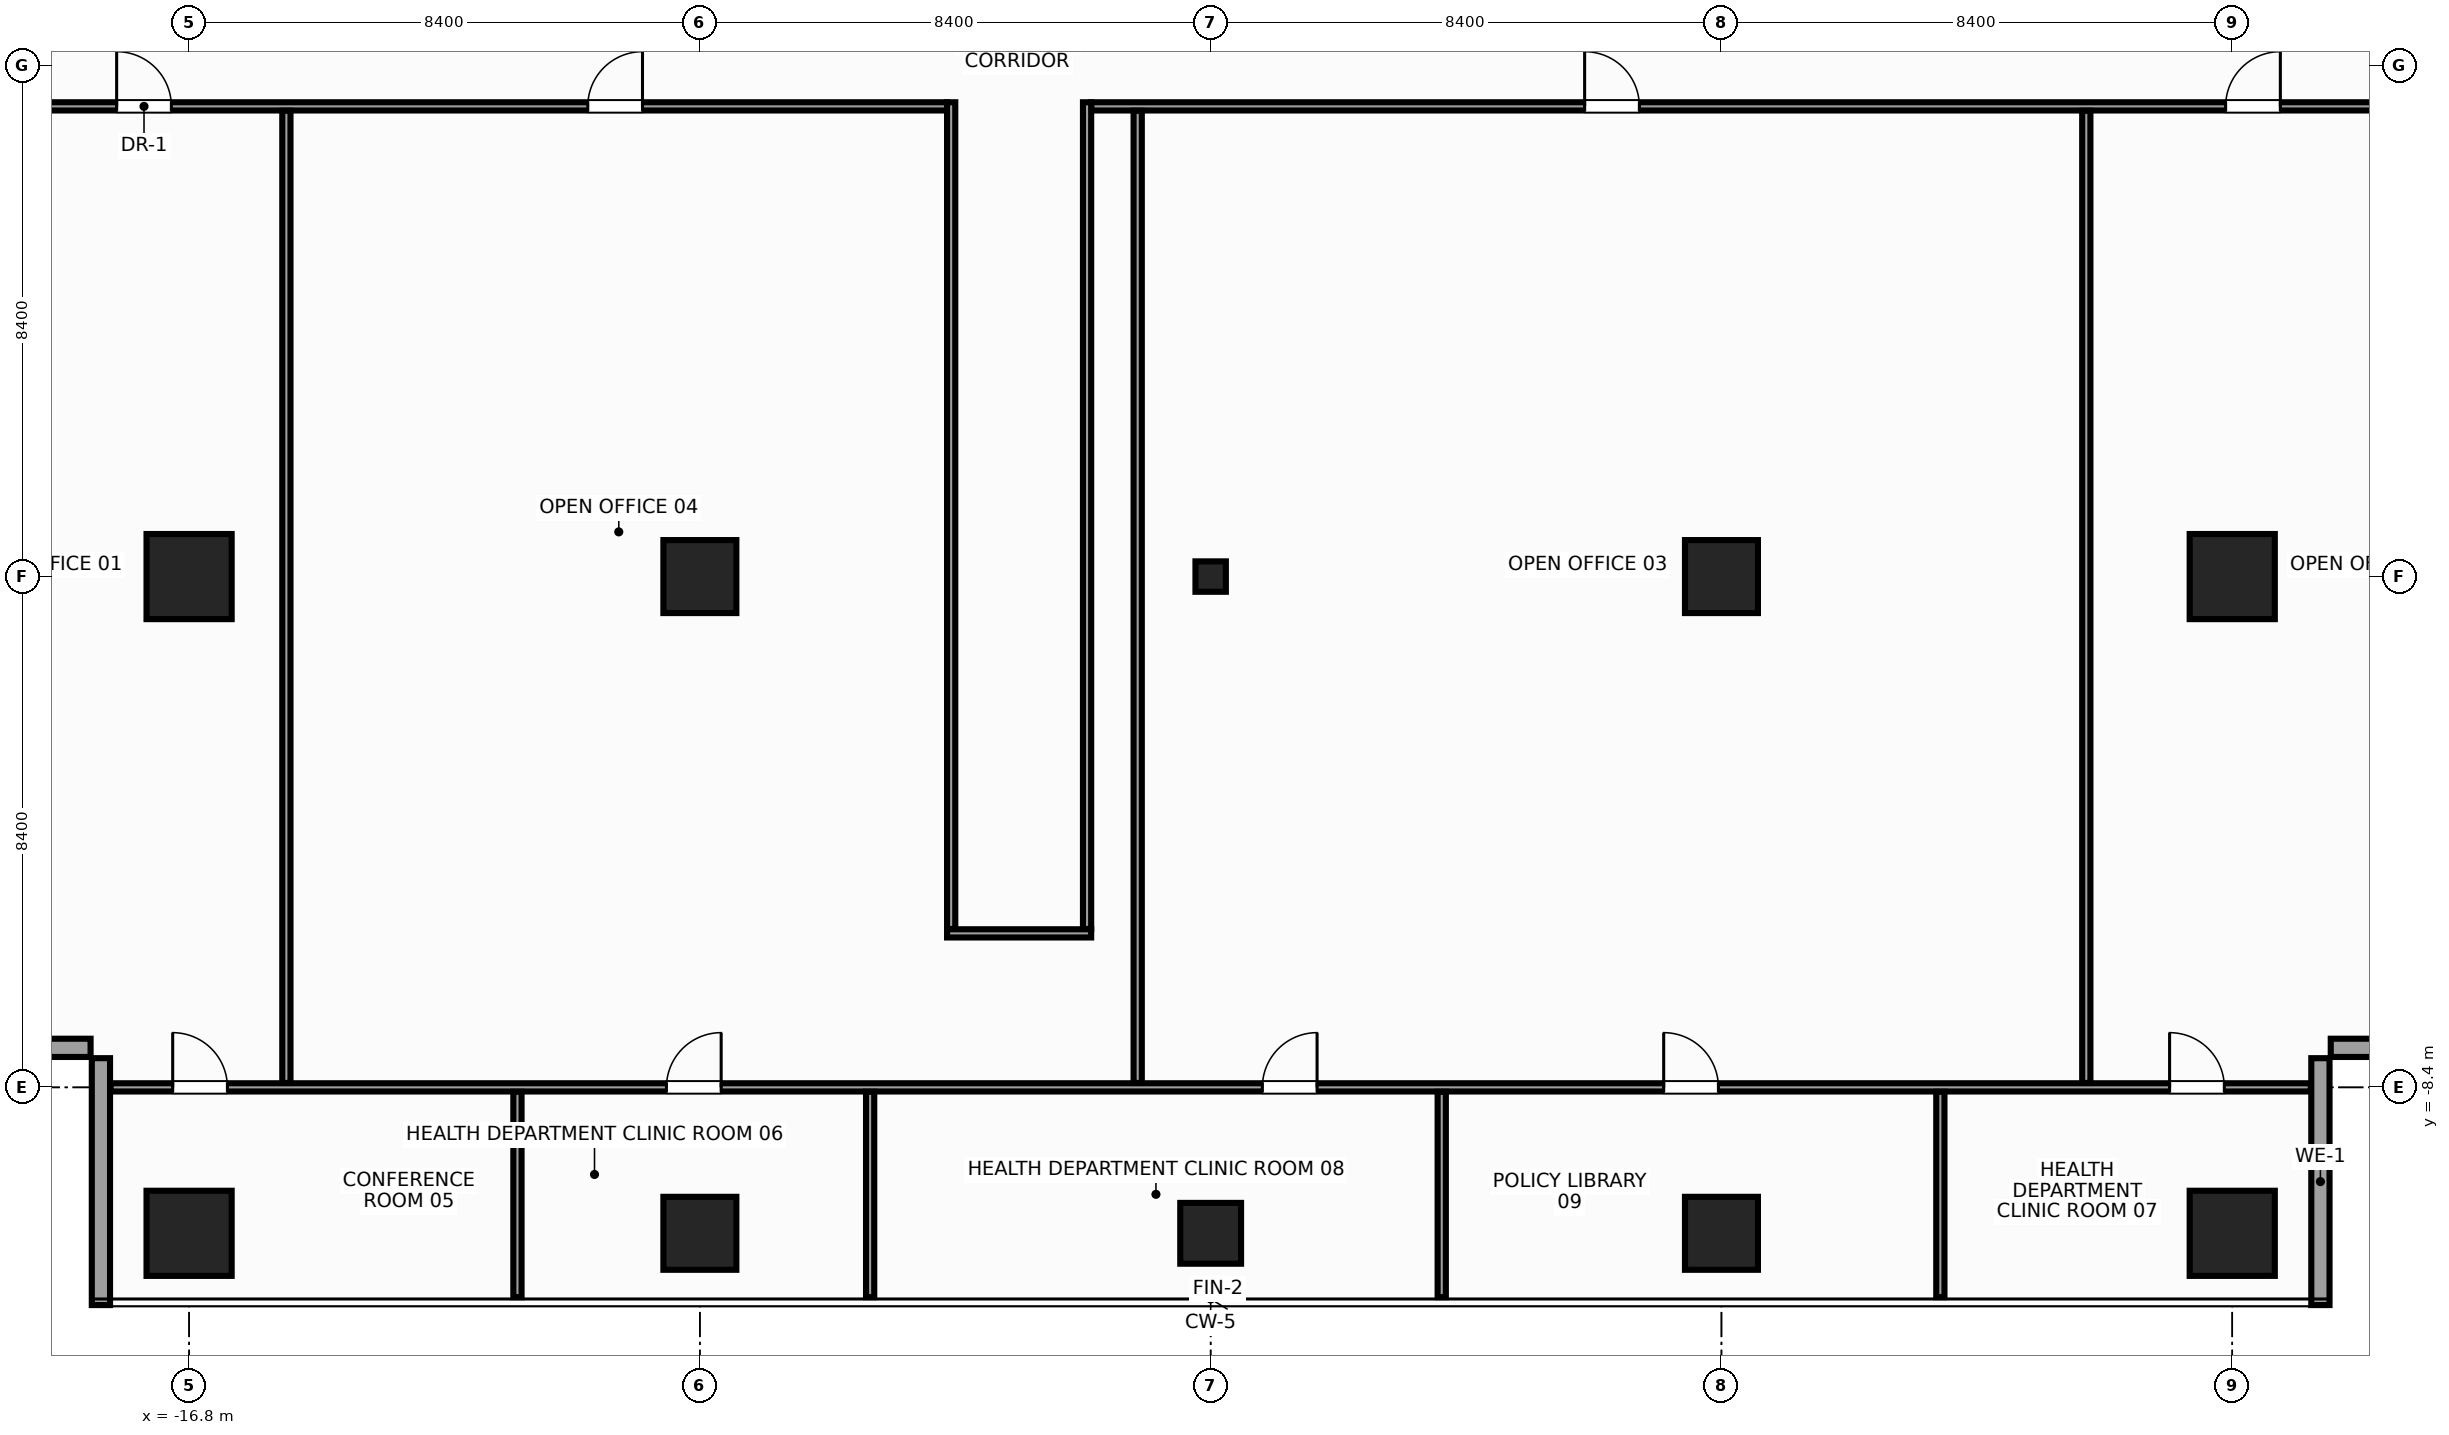
"""IFC4 building model, lengths in metres.
Left out: names, types, materials, properties, quantities, classifications, styles, units other than length and angle.
Written with IfcOpenShell. Run it as: python <this file> out.ifc"""

import sys

from ifc_helpers import new_model, si_unit, direction, frame, frame_2d, origin, origin_with_axes, origin_2d, place, context, subcontext, project, spatial, rectangle, hollow_rectangle, extrude, source, transform, mapped, element, fill, save


model = new_model("IFC4")
c1 = context("Model", 3, precision=1e-05, world=origin(), true_north=direction((0.0, 1.0)))
c2 = subcontext(c1, "Body", "Model", "MODEL_VIEW")
j1 = project(units=[si_unit("LENGTHUNIT", "METRE"), si_unit("PLANEANGLEUNIT", "RADIAN")], contexts=[c1])
p1 = place(None, origin())
s1 = spatial("IfcSite", under=j1, at=p1, CompositionType="ELEMENT")
p2 = place(p1, origin())
s2 = spatial("IfcBuilding", under=s1, at=p2, CompositionType="ELEMENT")
p3 = place(p2, frame((0.0, 0.0, 232.4)))
s3 = spatial("IfcBuildingStorey", under=s2, at=p3, CompositionType="ELEMENT", Elevation=232.4)
m1 = source(origin(), c2, "Body", "SweptSolid", [
    extrude(rectangle(XDim=1.4, YDim=1.4, at=origin_2d()), origin(), (0.0, 0.0, 1.0), 3.6),
])
for number, where, z_axis, x_axis in (
    (1, (-16.8, -10.8, 0.0), (0.0, 0.0, 1.0), (1.0, 0.0, 0.0)),
    (2, (-16.8, 0.0, 0.0), (0.0, 0.0, 1.0), (1.0, 0.0, 0.0)),
    (3, (16.8, -10.8, 0.0), (0.0, 0.0, 1.0), (1.0, 0.0, 0.0)),
    (4, (16.8, 0.0, 0.0), (0.0, 0.0, 1.0), (1.0, 0.0, 0.0)),
):
    element("IfcColumn", number, at=place(p3, frame(where, z_axis=z_axis, x_axis=x_axis)), inside=s3, PredefinedType="COLUMN", context=c2, shape_type="MappedRepresentation", body=[
        mapped(m1, transform((0.0, 0.0, 0.0), x_axis=(1.0, 0.0, 0.0), y_axis=(0.0, 1.0, 0.0), z_axis=(0.0, 0.0, 1.0), scale=1.0)),
    ])
m2 = source(origin(), c2, "Body", "SweptSolid", [
    extrude(rectangle(XDim=1.2, YDim=1.2, at=origin_2d()), origin(), (0.0, 0.0, 1.0), 3.6),
])
for number, where, z_axis, x_axis in (
    (5, (-8.4, 0.0, 0.0), (0.0, 0.0, 1.0), (1.0, 0.0, 0.0)),
    (6, (-8.4, -10.8, 0.0), (0.0, 0.0, 1.0), (1.0, 0.0, 0.0)),
    (7, (8.4, 0.0, 0.0), (0.0, 0.0, 1.0), (1.0, 0.0, 0.0)),
    (8, (8.4, -10.8, 0.0), (0.0, 0.0, 1.0), (1.0, 0.0, 0.0)),
):
    element("IfcColumn", number, at=place(p3, frame(where, z_axis=z_axis, x_axis=x_axis)), inside=s3, PredefinedType="COLUMN", context=c2, shape_type="MappedRepresentation", body=[
        mapped(m2, transform((0.0, 0.0, 0.0), x_axis=(1.0, 0.0, 0.0), y_axis=(0.0, 1.0, 0.0), z_axis=(0.0, 0.0, 1.0), scale=1.0)),
    ])
m3 = source(origin(), c2, "Body", "SweptSolid", [
    extrude(rectangle(XDim=1.0, YDim=1.0, at=origin_2d()), origin(), (0.0, 0.0, 1.0), 3.6),
])
p4 = place(p3, frame((0.0, -10.8, 0.0), z_axis=(0.0, 0.0, 1.0), x_axis=(1.0, 0.0, 0.0)))
e9 = element("IfcColumn", 9, at=p4, inside=s3, PredefinedType="COLUMN", context=c2, shape_type="MappedRepresentation", body=[
    mapped(m3, transform((0.0, 0.0, 0.0), x_axis=(1.0, 0.0, 0.0), y_axis=(0.0, 1.0, 0.0), z_axis=(0.0, 0.0, 1.0), scale=1.0)),
])
m4 = source(origin(), c2, "Body", "SweptSolid", [
    extrude(hollow_rectangle(XDim=0.5, YDim=0.5, WallThickness=0.025, at=origin_2d()), origin(), (0.0, 0.0, 1.0), 3.6),
])
p5 = place(p3, origin_with_axes())
e10 = element("IfcColumn", 10, at=p5, inside=s3, PredefinedType="COLUMN", context=c2, shape_type="MappedRepresentation", body=[
    mapped(m4, transform((0.0, 0.0, 0.0), x_axis=(1.0, 0.0, 0.0), y_axis=(0.0, 1.0, 0.0), z_axis=(0.0, 0.0, 1.0), scale=1.0)),
])
m5 = source(origin(), c2, "Body", "SweptSolid", [
    extrude(rectangle(XDim=4.06, YDim=0.3, at=frame_2d((2.03, 0.0))), origin(), (0.0, 0.0, 1.0), 2.75),
])
for number, where, z_axis, x_axis in (
    (11, (18.25, -11.98, 0.0), (0.0, 0.0, 1.0), (0.0, 1.0, 0.0)),
    (12, (18.42, -7.75, 0.0), (0.0, 0.0, 1.0), (1.0, 0.0, 0.0)),
    (13, (-22.48, -7.75, 0.0), (0.0, 0.0, 1.0), (1.0, 0.0, 0.0)),
    (14, (-18.25, -7.92, 0.0), (0.0, 0.0, 1.0), (0.0, -1.0, 0.0)),
):
    element("IfcWall", number, at=place(p3, frame(where, z_axis=z_axis, x_axis=x_axis)), inside=s3, PredefinedType="STANDARD", context=c2, shape_type="MappedRepresentation", body=[
        mapped(m5, transform((0.0, 0.0, 0.0), x_axis=(1.0, 0.0, 0.0), y_axis=(0.0, 1.0, 0.0), z_axis=(0.0, 0.0, 1.0), scale=1.0)),
    ])
m6 = source(origin(), c2, "Body", "SweptSolid", [
    extrude(rectangle(XDim=15.6, YDim=0.135, at=frame_2d((7.8, 0.0))), origin(), (0.0, 0.0, 1.0), 2.755),
])
p6 = place(p3, frame((-19.935, 7.732, 0.0), z_axis=(0.0, 0.0, 1.0), x_axis=(1.0, 0.0, 0.0)))
e15 = element("IfcWall", 15, at=p6, inside=s3, PredefinedType="PARTITIONING", context=c2, shape_type="MappedRepresentation", body=[
    mapped(m6, transform((0.0, 0.0, 0.0), x_axis=(1.0, 0.0, 0.0), y_axis=(0.0, 1.0, 0.0), z_axis=(0.0, 0.0, 1.0), scale=1.0)),
])
p7 = place(p6, frame((1.944, 0.0, 0.0)))
e16 = element("IfcOpeningElement", 16, at=p7, cuts=e15, PredefinedType="OPENING", context=c2, shape_type="SweptSolid", body=[
    extrude(rectangle(XDim=0.9, YDim=2.15, at=frame_2d((0.45, 1.075))), frame((0.0, 0.08, 0.0), z_axis=(0.0, -1.0, 0.0), x_axis=(1.0, 0.0, 0.0)), (0.0, 0.0, 1.0), 0.159),
])
p8 = place(p6, frame((9.691, 0.0, 0.0)))
e17 = element("IfcOpeningElement", 17, at=p8, cuts=e15, PredefinedType="OPENING", context=c2, shape_type="SweptSolid", body=[
    extrude(rectangle(XDim=0.9, YDim=2.15, at=frame_2d((0.45, 1.075))), frame((0.0, 0.08, 0.0), z_axis=(0.0, -1.0, 0.0), x_axis=(1.0, 0.0, 0.0)), (0.0, 0.0, 1.0), 0.159),
])
m7 = source(origin(), c2, "Body", "SweptSolid", [
    extrude(rectangle(XDim=21.9, YDim=0.135, at=frame_2d((10.95, 0.0))), origin(), (0.0, 0.0, 1.0), 2.755),
])
p9 = place(p3, frame((-1.965, 7.732, 0.0), z_axis=(0.0, 0.0, 1.0), x_axis=(1.0, 0.0, 0.0)))
e18 = element("IfcWall", 18, at=p9, inside=s3, PredefinedType="PARTITIONING", context=c2, shape_type="MappedRepresentation", body=[
    mapped(m7, transform((0.0, 0.0, 0.0), x_axis=(1.0, 0.0, 0.0), y_axis=(0.0, 1.0, 0.0), z_axis=(0.0, 0.0, 1.0), scale=1.0)),
])
p10 = place(p9, frame((18.656, 0.0, 0.0)))
e19 = element("IfcOpeningElement", 19, at=p10, cuts=e18, PredefinedType="OPENING", context=c2, shape_type="SweptSolid", body=[
    extrude(rectangle(XDim=0.9, YDim=2.15, at=frame_2d((0.45, 1.075))), frame((0.0, 0.08, 0.0), z_axis=(0.0, -1.0, 0.0), x_axis=(1.0, 0.0, 0.0)), (0.0, 0.0, 1.0), 0.159),
])
p11 = place(p9, frame((8.115, 0.0, 0.0)))
e20 = element("IfcOpeningElement", 20, at=p11, cuts=e18, PredefinedType="OPENING", context=c2, shape_type="SweptSolid", body=[
    extrude(rectangle(XDim=0.9, YDim=2.15, at=frame_2d((0.45, 1.075))), frame((0.0, 0.08, 0.0), z_axis=(0.0, -1.0, 0.0), x_axis=(1.0, 0.0, 0.0)), (0.0, 0.0, 1.0), 0.159),
])
m8 = source(origin(), c2, "Body", "SweptSolid", [
    extrude(rectangle(XDim=2.37, YDim=0.135, at=frame_2d((1.185, 0.0))), origin(), (0.0, 0.0, 1.0), 3.37),
])
p12 = place(p3, frame((-4.335, -5.867, 0.0), z_axis=(0.0, 0.0, 1.0), x_axis=(1.0, 0.0, 0.0)))
e21 = element("IfcWall", 21, at=p12, inside=s3, PredefinedType="PARTITIONING", context=c2, shape_type="MappedRepresentation", body=[
    mapped(m8, transform((0.0, 0.0, 0.0), x_axis=(1.0, 0.0, 0.0), y_axis=(0.0, 1.0, 0.0), z_axis=(0.0, 0.0, 1.0), scale=1.0)),
])
m9 = source(origin(), c2, "Body", "SweptSolid", [
    extrude(rectangle(XDim=13.595, YDim=0.135, at=frame_2d((6.797, 0.0))), origin(), (0.0, 0.0, 1.0), 2.655),
])
for number, where, z_axis, x_axis in (
    (22, (-4.268, -5.795, 0.0), (0.0, 0.0, 1.0), (0.0, 1.0, 0.0)),
    (23, (-2.032, -5.795, 0.0), (0.0, 0.0, 1.0), (0.0, 1.0, 0.0)),
):
    element("IfcWall", number, at=place(p3, frame(where, z_axis=z_axis, x_axis=x_axis)), inside=s3, PredefinedType="PARTITIONING", context=c2, shape_type="MappedRepresentation", body=[
        mapped(m9, transform((0.0, 0.0, 0.0), x_axis=(1.0, 0.0, 0.0), y_axis=(0.0, 1.0, 0.0), z_axis=(0.0, 0.0, 1.0), scale=1.0)),
    ])
m10 = source(origin(), c2, "Body", "SweptSolid", [
    extrude(rectangle(XDim=36.184, YDim=0.135, at=frame_2d((18.092, 0.0))), origin(), (0.0, 0.0, 1.0), 2.755),
])
p13 = place(p3, frame((-18.092, -8.4, 0.0), z_axis=(0.0, 0.0, 1.0), x_axis=(1.0, 0.0, 0.0)))
e24 = element("IfcWall", 24, at=p13, inside=s3, PredefinedType="PARTITIONING", context=c2, shape_type="MappedRepresentation", body=[
    mapped(m10, transform((0.0, 0.0, 0.0), x_axis=(1.0, 0.0, 0.0), y_axis=(0.0, 1.0, 0.0), z_axis=(0.0, 0.0, 1.0), scale=1.0)),
])
p14 = place(p13, frame((1.022, 0.0, 0.0)))
e25 = element("IfcOpeningElement", 25, at=p14, cuts=e24, PredefinedType="OPENING", context=c2, shape_type="SweptSolid", body=[
    extrude(rectangle(XDim=0.9, YDim=2.15, at=frame_2d((0.45, 1.075))), frame((0.0, 0.08, 0.0), z_axis=(0.0, -1.0, 0.0), x_axis=(1.0, 0.0, 0.0)), (0.0, 0.0, 1.0), 0.159),
])
p15 = place(p13, frame((9.142, 0.0, 0.0)))
e26 = element("IfcOpeningElement", 26, at=p15, cuts=e24, PredefinedType="OPENING", context=c2, shape_type="SweptSolid", body=[
    extrude(rectangle(XDim=0.9, YDim=2.15, at=frame_2d((0.45, 1.075))), frame((0.0, 0.08, 0.0), z_axis=(0.0, -1.0, 0.0), x_axis=(1.0, 0.0, 0.0)), (0.0, 0.0, 1.0), 0.159),
])
p16 = place(p13, frame((33.862, 0.0, 0.0)))
e27 = element("IfcOpeningElement", 27, at=p16, cuts=e24, PredefinedType="OPENING", context=c2, shape_type="SweptSolid", body=[
    extrude(rectangle(XDim=0.9, YDim=2.15, at=frame_2d((0.45, 1.075))), frame((0.0, 0.08, 0.0), z_axis=(0.0, -1.0, 0.0), x_axis=(1.0, 0.0, 0.0)), (0.0, 0.0, 1.0), 0.159),
])
p17 = place(p13, frame((18.942, 0.0, 0.0)))
e28 = element("IfcOpeningElement", 28, at=p17, cuts=e24, PredefinedType="OPENING", context=c2, shape_type="SweptSolid", body=[
    extrude(rectangle(XDim=0.9, YDim=2.15, at=frame_2d((0.45, 1.075))), frame((0.0, 0.08, 0.0), z_axis=(0.0, -1.0, 0.0), x_axis=(1.0, 0.0, 0.0)), (0.0, 0.0, 1.0), 0.159),
])
p18 = place(p13, frame((25.542, 0.0, 0.0)))
e29 = element("IfcOpeningElement", 29, at=p18, cuts=e24, PredefinedType="OPENING", context=c2, shape_type="SweptSolid", body=[
    extrude(rectangle(XDim=0.9, YDim=2.15, at=frame_2d((0.45, 1.075))), frame((0.0, 0.08, 0.0), z_axis=(0.0, -1.0, 0.0), x_axis=(1.0, 0.0, 0.0)), (0.0, 0.0, 1.0), 0.159),
])
m11 = source(origin(), c2, "Body", "SweptSolid", [
    extrude(rectangle(XDim=15.987, YDim=0.135, at=frame_2d((7.994, 0.0))), origin(), (0.0, 0.0, 1.0), 2.655),
])
for number, where, z_axis, x_axis in (
    (30, (-15.2, -8.327, 0.0), (0.0, 0.0, 1.0), (0.0, 1.0, 0.0)),
    (31, (-1.2, -8.327, 0.0), (0.0, 0.0, 1.0), (0.0, 1.0, 0.0)),
    (32, (14.4, -8.327, 0.0), (0.0, 0.0, 1.0), (0.0, 1.0, 0.0)),
):
    element("IfcWall", number, at=place(p3, frame(where, z_axis=z_axis, x_axis=x_axis)), inside=s3, PredefinedType="PARTITIONING", context=c2, shape_type="MappedRepresentation", body=[
        mapped(m11, transform((0.0, 0.0, 0.0), x_axis=(1.0, 0.0, 0.0), y_axis=(0.0, 1.0, 0.0), z_axis=(0.0, 0.0, 1.0), scale=1.0)),
    ])
m12 = source(origin(), c2, "Body", "SweptSolid", [
    extrude(rectangle(XDim=3.378, YDim=0.135, at=frame_2d((1.689, 0.0))), origin(), (0.0, 0.0, 1.0), 2.905),
])
for number, where, z_axis, x_axis in (
    (33, (-11.4, -11.85, 0.0), (0.0, 0.0, 1.0), (0.0, 1.0, 0.0)),
    (34, (-5.6, -11.85, 0.0), (0.0, 0.0, 1.0), (0.0, 1.0, 0.0)),
    (35, (3.8, -11.85, 0.0), (0.0, 0.0, 1.0), (0.0, 1.0, 0.0)),
    (36, (12.0, -11.85, 0.0), (0.0, 0.0, 1.0), (0.0, 1.0, 0.0)),
):
    element("IfcWall", number, at=place(p3, frame(where, z_axis=z_axis, x_axis=x_axis)), inside=s3, PredefinedType="PARTITIONING", context=c2, shape_type="MappedRepresentation", body=[
        mapped(m12, transform((0.0, 0.0, 0.0), x_axis=(1.0, 0.0, 0.0), y_axis=(0.0, 1.0, 0.0), z_axis=(0.0, 0.0, 1.0), scale=1.0)),
    ])
m13 = source(origin(), c2, "Body", "SweptSolid", [
    extrude(rectangle(XDim=0.9, YDim=2.15, at=frame_2d((0.45, 1.075))), frame((0.0, 0.025, 0.0), z_axis=(0.0, -1.0, 0.0), x_axis=(1.0, 0.0, 0.0)), (0.0, 0.0, 1.0), 0.05),
])
p19 = place(p7, origin())
e37 = element("IfcDoor", 37, at=p19, inside=s3, OperationType="SINGLE_SWING_LEFT", PredefinedType="DOOR", context=c2, shape_type="MappedRepresentation", body=[
    mapped(m13, transform((0.0, 0.0, 0.0), x_axis=(1.0, 0.0, 0.0), y_axis=(0.0, 1.0, 0.0), z_axis=(0.0, 0.0, 1.0), scale=1.0)),
])
fill(e16, e37)
p20 = place(p10, origin())
e38 = element("IfcDoor", 38, at=p20, inside=s3, OperationType="SINGLE_SWING_RIGHT", PredefinedType="DOOR", context=c2, shape_type="MappedRepresentation", body=[
    mapped(m13, transform((0.0, 0.0, 0.0), x_axis=(1.0, 0.0, 0.0), y_axis=(0.0, 1.0, 0.0), z_axis=(0.0, 0.0, 1.0), scale=1.0)),
])
fill(e19, e38)
p21 = place(p11, origin())
e39 = element("IfcDoor", 39, at=p21, inside=s3, OperationType="SINGLE_SWING_LEFT", PredefinedType="DOOR", context=c2, shape_type="MappedRepresentation", body=[
    mapped(m13, transform((0.0, 0.0, 0.0), x_axis=(1.0, 0.0, 0.0), y_axis=(0.0, 1.0, 0.0), z_axis=(0.0, 0.0, 1.0), scale=1.0)),
])
fill(e20, e39)
p22 = place(p8, origin())
e40 = element("IfcDoor", 40, at=p22, inside=s3, OperationType="SINGLE_SWING_RIGHT", PredefinedType="DOOR", context=c2, shape_type="MappedRepresentation", body=[
    mapped(m13, transform((0.0, 0.0, 0.0), x_axis=(1.0, 0.0, 0.0), y_axis=(0.0, 1.0, 0.0), z_axis=(0.0, 0.0, 1.0), scale=1.0)),
])
fill(e17, e40)
p23 = place(p14, origin())
e41 = element("IfcDoor", 41, at=p23, inside=s3, OperationType="SINGLE_SWING_LEFT", PredefinedType="DOOR", context=c2, shape_type="MappedRepresentation", body=[
    mapped(m13, transform((0.0, 0.0, 0.0), x_axis=(1.0, 0.0, 0.0), y_axis=(0.0, 1.0, 0.0), z_axis=(0.0, 0.0, 1.0), scale=1.0)),
])
fill(e25, e41)
p24 = place(p15, origin())
e42 = element("IfcDoor", 42, at=p24, inside=s3, OperationType="SINGLE_SWING_RIGHT", PredefinedType="DOOR", context=c2, shape_type="MappedRepresentation", body=[
    mapped(m13, transform((0.0, 0.0, 0.0), x_axis=(1.0, 0.0, 0.0), y_axis=(0.0, 1.0, 0.0), z_axis=(0.0, 0.0, 1.0), scale=1.0)),
])
fill(e26, e42)
p25 = place(p16, origin())
e43 = element("IfcDoor", 43, at=p25, inside=s3, OperationType="SINGLE_SWING_LEFT", PredefinedType="DOOR", context=c2, shape_type="MappedRepresentation", body=[
    mapped(m13, transform((0.0, 0.0, 0.0), x_axis=(1.0, 0.0, 0.0), y_axis=(0.0, 1.0, 0.0), z_axis=(0.0, 0.0, 1.0), scale=1.0)),
])
fill(e27, e43)
p26 = place(p17, origin())
e44 = element("IfcDoor", 44, at=p26, inside=s3, OperationType="SINGLE_SWING_RIGHT", PredefinedType="DOOR", context=c2, shape_type="MappedRepresentation", body=[
    mapped(m13, transform((0.0, 0.0, 0.0), x_axis=(1.0, 0.0, 0.0), y_axis=(0.0, 1.0, 0.0), z_axis=(0.0, 0.0, 1.0), scale=1.0)),
])
fill(e28, e44)
p27 = place(p18, origin())
e45 = element("IfcDoor", 45, at=p27, inside=s3, OperationType="SINGLE_SWING_LEFT", PredefinedType="DOOR", context=c2, shape_type="MappedRepresentation", body=[
    mapped(m13, transform((0.0, 0.0, 0.0), x_axis=(1.0, 0.0, 0.0), y_axis=(0.0, 1.0, 0.0), z_axis=(0.0, 0.0, 1.0), scale=1.0)),
])
fill(e29, e45)
save(model, sys.argv[1])
